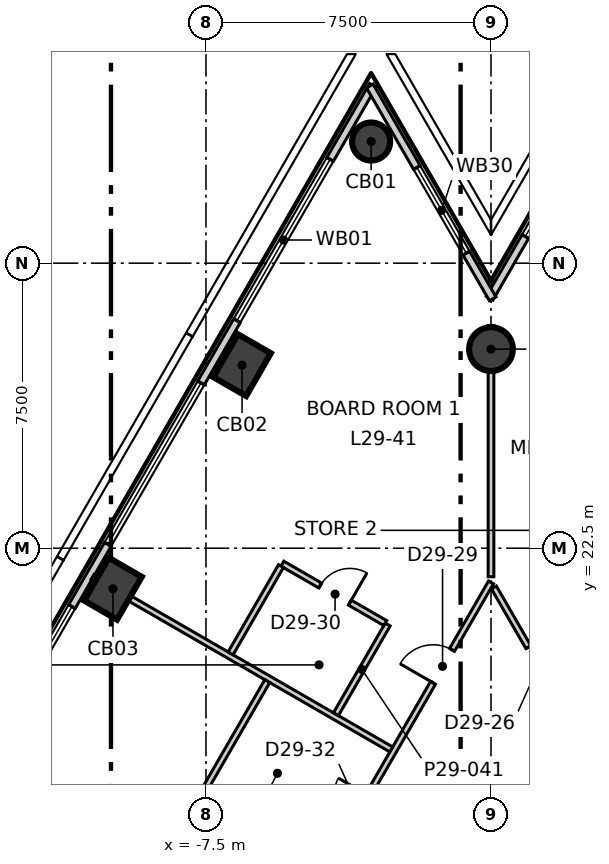
"""IFC4 building model, lengths in metres.
Left out: names, types, materials, properties, quantities, classifications, styles, units other than length and angle.
Written with IfcOpenShell. Run it as: python <this file> out.ifc"""

import sys

from ifc_helpers import new_model, si_unit, direction, frame, frame_2d, origin, origin_2d, place, context, subcontext, project, spatial, rectangle, circle, extrude, element, fill, save


model = new_model("IFC4")
c1 = context("Model", 3, precision=1e-05, world=origin(), true_north=direction((0.0, 1.0)))
c2 = subcontext(c1, "Body", "Model", "MODEL_VIEW")
j1 = project(units=[si_unit("LENGTHUNIT", "METRE"), si_unit("PLANEANGLEUNIT", "RADIAN")], contexts=[c1])
p1 = place(None, origin())
s1 = spatial("IfcSite", under=j1, at=p1, CompositionType="ELEMENT")
p2 = place(p1, origin())
s2 = spatial("IfcBuilding", under=s1, at=p2, CompositionType="ELEMENT")
p3 = place(p2, frame((0.0, 0.0, 128.3)))
s3 = spatial("IfcBuildingStorey", under=s2, at=p3, CompositionType="ELEMENT", Elevation=128.3)
p4 = place(p3, frame((-3.154, 33.201, -0.3), z_axis=(0.0, 0.0, 1.0), x_axis=(0.5, 0.866025403784, 0.0)))
e1 = element("IfcColumn", 1, at=p4, inside=s3, PredefinedType="COLUMN", context=c2, shape_type="SweptSolid", body=[
    extrude(circle(Radius=0.5, at=origin_2d()), origin(), (0.0, 0.0, 1.0), 4.0),
])
for number, where, z_axis, x_axis in (
    (2, (-6.551, 27.317, -0.3), (0.0, 0.0, 1.0), (0.5, 0.866, 0.0)),
    (3, (-9.948, 21.434, -0.3), (0.0, 0.0, 1.0), (0.5, 0.866, 0.0)),
):
    element("IfcColumn", number, at=place(p3, frame(where, z_axis=z_axis, x_axis=x_axis)), inside=s3, PredefinedType="COLUMN", context=c2, shape_type="SweptSolid", body=[
        extrude(rectangle(XDim=1.3, YDim=1.0, at=origin_2d()), origin(), (0.0, 0.0, 1.0), 4.0),
    ])
p5 = place(p3, frame((0.0, 27.739, -0.3), z_axis=(0.0, 0.0, 1.0), x_axis=(1.0, 0.0, 0.0)))
e4 = element("IfcColumn", 4, at=p5, inside=s3, PredefinedType="COLUMN", context=c2, shape_type="SweptSolid", body=[
    extrude(circle(Radius=0.575, at=origin_2d()), origin(), (0.0, 0.0, 1.0), 4.0),
])
p6 = place(p3, frame((-3.109, 34.679, 0.0), z_axis=(0.0, 0.0, 1.0), x_axis=(-0.50000689325, -0.866021423928, 0.0)))
e5 = element("IfcWall", 5, at=p6, inside=s3, PredefinedType="ELEMENTEDWALL", context=c2, shape_type="SweptSolid", body=[
    extrude(rectangle(XDim=56.937, YDim=0.2, at=frame_2d((28.469, 0.0))), origin(), (0.0, 0.0, 1.0), 3.7),
])
p7 = place(p6, frame((2.249, 0.0, 0.9)))
e6 = element("IfcOpeningElement", 6, at=p7, cuts=e5, PredefinedType="OPENING", context=c2, shape_type="SweptSolid", body=[
    extrude(rectangle(XDim=4.9, YDim=2.5, at=frame_2d((2.45, 1.25))), frame((0.0, 0.11, 0.0), z_axis=(0.0, -1.0, 0.0), x_axis=(1.0, 0.0, 0.0)), (0.0, 0.0, 1.0), 0.22),
])
p8 = place(p6, frame((9.043, 0.0, 0.9)))
e7 = element("IfcOpeningElement", 7, at=p8, cuts=e5, PredefinedType="OPENING", context=c2, shape_type="SweptSolid", body=[
    extrude(rectangle(XDim=4.9, YDim=2.5, at=frame_2d((2.45, 1.25))), frame((0.0, 0.11, 0.0), z_axis=(0.0, -1.0, 0.0), x_axis=(1.0, 0.0, 0.0)), (0.0, 0.0, 1.0), 0.22),
])
p9 = place(p6, frame((15.837, 0.0, 0.9)))
e8 = element("IfcOpeningElement", 8, at=p9, cuts=e5, PredefinedType="OPENING", context=c2, shape_type="SweptSolid", body=[
    extrude(rectangle(XDim=4.9, YDim=2.5, at=frame_2d((2.45, 1.25))), frame((0.0, 0.11, 0.0), z_axis=(0.0, -1.0, 0.0), x_axis=(1.0, 0.0, 0.0)), (0.0, 0.0, 1.0), 0.22),
])
p10 = place(p6, frame((22.631, 0.0, 0.9)))
e9 = element("IfcOpeningElement", 9, at=p10, cuts=e5, PredefinedType="OPENING", context=c2, shape_type="SweptSolid", body=[
    extrude(rectangle(XDim=4.9, YDim=2.5, at=frame_2d((2.45, 1.25))), frame((0.0, 0.11, 0.0), z_axis=(0.0, -1.0, 0.0), x_axis=(1.0, 0.0, 0.0)), (0.0, 0.0, 1.0), 0.22),
])
p11 = place(p6, frame((29.425, 0.0, 0.9)))
e10 = element("IfcOpeningElement", 10, at=p11, cuts=e5, PredefinedType="OPENING", context=c2, shape_type="SweptSolid", body=[
    extrude(rectangle(XDim=4.9, YDim=2.5, at=frame_2d((2.45, 1.25))), frame((0.0, 0.11, 0.0), z_axis=(0.0, -1.0, 0.0), x_axis=(1.0, 0.0, 0.0)), (0.0, 0.0, 1.0), 0.22),
])
p12 = place(p6, frame((36.219, 0.0, 0.9)))
e11 = element("IfcOpeningElement", 11, at=p12, cuts=e5, PredefinedType="OPENING", context=c2, shape_type="SweptSolid", body=[
    extrude(rectangle(XDim=4.9, YDim=2.5, at=frame_2d((2.45, 1.25))), frame((0.0, 0.11, 0.0), z_axis=(0.0, -1.0, 0.0), x_axis=(1.0, 0.0, 0.0)), (0.0, 0.0, 1.0), 0.22),
])
p13 = place(p6, frame((43.013, 0.0, 0.9)))
e12 = element("IfcOpeningElement", 12, at=p13, cuts=e5, PredefinedType="OPENING", context=c2, shape_type="SweptSolid", body=[
    extrude(rectangle(XDim=4.9, YDim=2.5, at=frame_2d((2.45, 1.25))), frame((0.0, 0.11, 0.0), z_axis=(0.0, -1.0, 0.0), x_axis=(1.0, 0.0, 0.0)), (0.0, 0.0, 1.0), 0.22),
])
p14 = place(p6, frame((49.807, 0.0, 0.9)))
e13 = element("IfcOpeningElement", 13, at=p14, cuts=e5, PredefinedType="OPENING", context=c2, shape_type="SweptSolid", body=[
    extrude(rectangle(XDim=4.9, YDim=2.5, at=frame_2d((2.45, 1.25))), frame((0.0, 0.11, 0.0), z_axis=(0.0, -1.0, 0.0), x_axis=(1.0, 0.0, 0.0)), (0.0, 0.0, 1.0), 0.22),
])
p15 = place(p3, frame((3.199, 34.679, 0.0), z_axis=(0.0, 0.0, 1.0), x_axis=(-0.500012177251, -0.866018373131, 0.0)))
e14 = element("IfcWall", 14, at=p15, inside=s3, PredefinedType="ELEMENTEDWALL", context=c2, shape_type="SweptSolid", body=[
    extrude(rectangle(XDim=6.468, YDim=0.2, at=frame_2d((3.234, 0.0))), origin(), (0.0, 0.0, 1.0), 3.7),
])
p16 = place(p15, frame((1.99, 0.0, 0.9)))
e15 = element("IfcOpeningElement", 15, at=p16, cuts=e14, PredefinedType="OPENING", context=c2, shape_type="SweptSolid", body=[
    extrude(rectangle(XDim=2.6, YDim=2.5, at=frame_2d((1.3, 1.25))), frame((0.0, 0.11, 0.0), z_axis=(0.0, -1.0, 0.0), x_axis=(1.0, 0.0, 0.0)), (0.0, 0.0, 1.0), 0.22),
])
p17 = place(p3, frame((0.045, 29.061, 0.0), z_axis=(0.0, 0.0, 1.0), x_axis=(-0.500012177251, 0.866018373131, 0.0)))
e16 = element("IfcWall", 16, at=p17, inside=s3, PredefinedType="ELEMENTEDWALL", context=c2, shape_type="SweptSolid", body=[
    extrude(rectangle(XDim=6.468, YDim=0.2, at=frame_2d((3.234, 0.0))), origin(), (0.0, 0.0, 1.0), 3.7),
])
p18 = place(p17, frame((1.39, 0.0, 0.9)))
e17 = element("IfcOpeningElement", 17, at=p18, cuts=e16, PredefinedType="OPENING", context=c2, shape_type="SweptSolid", body=[
    extrude(rectangle(XDim=2.6, YDim=2.5, at=frame_2d((1.3, 1.25))), frame((0.0, 0.11, 0.0), z_axis=(0.0, -1.0, 0.0), x_axis=(1.0, 0.0, 0.0)), (0.0, 0.0, 1.0), 0.22),
])
p19 = place(p3, frame((-8.903, 6.18, 0.0), z_axis=(0.0, 0.0, 1.0), x_axis=(0.500010074151, 0.866019587393, 0.0)))
e18 = element("IfcWall", 18, at=p19, inside=s3, PredefinedType="PARTITIONING", context=c2, shape_type="SweptSolid", body=[
    extrude(rectangle(XDim=17.806, YDim=0.15, at=frame_2d((8.903, 0.0))), origin(), (0.0, 0.0, 1.0), 3.7),
])
p20 = place(p19, frame((14.756, 0.0, 0.0)))
e19 = element("IfcOpeningElement", 19, at=p20, cuts=e18, PredefinedType="OPENING", context=c2, shape_type="SweptSolid", body=[
    extrude(rectangle(XDim=1.0, YDim=2.1, at=frame_2d((0.5, 1.05))), frame((0.0, 0.085, 0.0), z_axis=(0.0, -1.0, 0.0), x_axis=(1.0, 0.0, 0.0)), (0.0, 0.0, 1.0), 0.17),
])
p21 = place(p19, frame((2.838, 0.0, 0.0)))
e20 = element("IfcOpeningElement", 20, at=p21, cuts=e18, PredefinedType="OPENING", context=c2, shape_type="SweptSolid", body=[
    extrude(rectangle(XDim=1.1, YDim=2.1, at=frame_2d((0.55, 1.05))), frame((0.0, 0.085, 0.0), z_axis=(0.0, -1.0, 0.0), x_axis=(1.0, 0.0, 0.0)), (0.0, 0.0, 1.0), 0.17),
])
p22 = place(p19, frame((10.438, 0.0, 0.0)))
e21 = element("IfcOpeningElement", 21, at=p22, cuts=e18, PredefinedType="OPENING", context=c2, shape_type="SweptSolid", body=[
    extrude(rectangle(XDim=0.9, YDim=2.1, at=frame_2d((0.45, 1.05))), frame((0.0, 0.085, 0.0), z_axis=(0.0, -1.0, 0.0), x_axis=(1.0, 0.0, 0.0)), (0.0, 0.0, 1.0), 0.17),
])
p23 = place(p19, frame((7.438, 0.0, 0.0)))
e22 = element("IfcOpeningElement", 22, at=p23, cuts=e18, PredefinedType="OPENING", context=c2, shape_type="SweptSolid", body=[
    extrude(rectangle(XDim=0.9, YDim=2.1, at=frame_2d((0.45, 1.05))), frame((0.0, 0.085, 0.0), z_axis=(0.0, -1.0, 0.0), x_axis=(1.0, 0.0, 0.0)), (0.0, 0.0, 1.0), 0.17),
])
p24 = place(p3, frame((-10.485, 21.744, 0.0), z_axis=(0.0, 0.0, 1.0), x_axis=(0.866014937375, -0.500018127915, 0.0)))
e23 = element("IfcWall", 23, at=p24, inside=s3, PredefinedType="PARTITIONING", context=c2, shape_type="SweptSolid", body=[
    extrude(rectangle(XDim=9.077, YDim=0.15, at=frame_2d((4.539, 0.0))), origin(), (0.0, 0.0, 1.0), 3.7),
])
p25 = place(p3, frame((-7.65, 15.95, 0.0), z_axis=(0.0, 0.0, 1.0), x_axis=(0.500064136673, 0.865988371292, 0.0)))
e24 = element("IfcWall", 24, at=p25, inside=s3, PredefinedType="PARTITIONING", context=c2, shape_type="SweptSolid", body=[
    extrude(rectangle(XDim=3.525, YDim=0.15, at=frame_2d((1.763, 0.0))), origin(), (0.0, 0.0, 1.0), 3.7),
])
p26 = place(p3, frame((0.0, 21.75, 0.0), z_axis=(0.0, 0.0, 1.0), x_axis=(0.0, 1.0, 0.0)))
e25 = element("IfcWall", 25, at=p26, inside=s3, PredefinedType="PARTITIONING", context=c2, shape_type="SweptSolid", body=[
    extrude(rectangle(XDim=6.609, YDim=0.15, at=frame_2d((3.304, 0.0))), origin(), (0.0, 0.0, 1.0), 3.15),
])
p27 = place(p3, frame((0.076, 21.468, 0.0), z_axis=(0.0, 0.0, 1.0), x_axis=(0.50001203818, -0.866018453426, 0.0)))
e26 = element("IfcWall", 26, at=p27, inside=s3, PredefinedType="PARTITIONING", context=c2, shape_type="SweptSolid", body=[
    extrude(rectangle(XDim=24.448, YDim=0.15, at=frame_2d((12.224, 0.0))), origin(), (0.0, 0.0, 1.0), 3.7),
])
p28 = place(p27, frame((9.798, 0.0, 0.0)))
e27 = element("IfcOpeningElement", 27, at=p28, cuts=e26, PredefinedType="OPENING", context=c2, shape_type="SweptSolid", body=[
    extrude(rectangle(XDim=1.1, YDim=2.1, at=frame_2d((0.55, 1.05))), frame((0.0, 0.085, 0.0), z_axis=(0.0, -1.0, 0.0), x_axis=(1.0, 0.0, 0.0)), (0.0, 0.0, 1.0), 0.17),
])
p29 = place(p27, frame((19.198, 0.0, 0.0)))
e28 = element("IfcOpeningElement", 28, at=p29, cuts=e26, PredefinedType="OPENING", context=c2, shape_type="SweptSolid", body=[
    extrude(rectangle(XDim=0.9, YDim=2.1, at=frame_2d((0.45, 1.05))), frame((0.0, 0.085, 0.0), z_axis=(0.0, -1.0, 0.0), x_axis=(1.0, 0.0, 0.0)), (0.0, 0.0, 1.0), 0.17),
])
p30 = place(p27, frame((16.398, 0.0, 0.0)))
e29 = element("IfcOpeningElement", 29, at=p30, cuts=e26, PredefinedType="OPENING", context=c2, shape_type="SweptSolid", body=[
    extrude(rectangle(XDim=1.0, YDim=2.1, at=frame_2d((0.5, 1.05))), frame((0.0, 0.085, 0.0), z_axis=(0.0, -1.0, 0.0), x_axis=(1.0, 0.0, 0.0)), (0.0, 0.0, 1.0), 0.17),
])
p31 = place(p27, frame((1.815, 0.0, 0.0)))
e30 = element("IfcOpeningElement", 30, at=p31, cuts=e26, PredefinedType="OPENING", context=c2, shape_type="SweptSolid", body=[
    extrude(rectangle(XDim=1.1, YDim=2.1, at=frame_2d((0.55, 1.05))), frame((0.0, 0.085, 0.0), z_axis=(0.0, -1.0, 0.0), x_axis=(1.0, 0.0, 0.0)), (0.0, 0.0, 1.0), 0.17),
])
p32 = place(p3, frame((-4.08, 18.133, 0.0), z_axis=(0.0, 0.0, 1.0), x_axis=(0.499887924105, 0.866090101164, 0.0)))
e31 = element("IfcWall", 31, at=p32, inside=s3, PredefinedType="PARTITIONING", context=c2, shape_type="SweptSolid", body=[
    extrude(rectangle(XDim=2.725, YDim=0.15, at=frame_2d((1.362, 0.0))), origin(), (0.0, 0.0, 1.0), 3.7),
])
p33 = place(p3, frame((-5.489, 22.093, 0.0), z_axis=(0.0, 0.0, 1.0), x_axis=(0.865935755868, -0.500155242608, 0.0)))
e32 = element("IfcWall", 32, at=p33, inside=s3, PredefinedType="PARTITIONING", context=c2, shape_type="SweptSolid", body=[
    extrude(rectangle(XDim=3.125, YDim=0.15, at=frame_2d((1.562, 0.0))), origin(), (0.0, 0.0, 1.0), 3.7),
])
p34 = place(p33, frame((1.15, 0.0, 0.0)))
e33 = element("IfcOpeningElement", 33, at=p34, cuts=e32, PredefinedType="OPENING", context=c2, shape_type="SweptSolid", body=[
    extrude(rectangle(XDim=0.9, YDim=2.1, at=frame_2d((0.45, 1.05))), frame((0.0, 0.085, 0.0), z_axis=(0.0, -1.0, 0.0), x_axis=(1.0, 0.0, 0.0)), (0.0, 0.0, 1.0), 0.17),
])
p35 = place(p3, frame((-6.852, 19.733, 0.0), z_axis=(0.0, 0.0, 1.0), x_axis=(0.499953715521, 0.866052124492, 0.0)))
e34 = element("IfcWall", 34, at=p35, inside=s3, PredefinedType="PARTITIONING", context=c2, shape_type="SweptSolid", body=[
    extrude(rectangle(XDim=2.65, YDim=0.15, at=frame_2d((1.325, 0.0))), origin(), (0.0, 0.0, 1.0), 3.7),
])
p36 = place(p7, origin())
e35 = element("IfcWindow", 35, at=p36, inside=s3, PartitioningType="SINGLE_PANEL", PredefinedType="WINDOW", context=c2, shape_type="SweptSolid", body=[
    extrude(rectangle(XDim=4.9, YDim=2.5, at=frame_2d((2.45, 1.25))), frame((0.0, 0.03, 0.0), z_axis=(0.0, -1.0, 0.0), x_axis=(1.0, 0.0, 0.0)), (0.0, 0.0, 1.0), 0.06),
])
fill(e6, e35)
p37 = place(p8, origin())
e36 = element("IfcWindow", 36, at=p37, inside=s3, PartitioningType="SINGLE_PANEL", PredefinedType="WINDOW", context=c2, shape_type="SweptSolid", body=[
    extrude(rectangle(XDim=4.9, YDim=2.5, at=frame_2d((2.45, 1.25))), frame((0.0, 0.03, 0.0), z_axis=(0.0, -1.0, 0.0), x_axis=(1.0, 0.0, 0.0)), (0.0, 0.0, 1.0), 0.06),
])
fill(e7, e36)
p38 = place(p9, origin())
e37 = element("IfcWindow", 37, at=p38, inside=s3, PartitioningType="SINGLE_PANEL", PredefinedType="WINDOW", context=c2, shape_type="SweptSolid", body=[
    extrude(rectangle(XDim=4.9, YDim=2.5, at=frame_2d((2.45, 1.25))), frame((0.0, 0.03, 0.0), z_axis=(0.0, -1.0, 0.0), x_axis=(1.0, 0.0, 0.0)), (0.0, 0.0, 1.0), 0.06),
])
fill(e8, e37)
p39 = place(p16, origin())
e38 = element("IfcWindow", 38, at=p39, inside=s3, PartitioningType="SINGLE_PANEL", PredefinedType="WINDOW", context=c2, shape_type="SweptSolid", body=[
    extrude(rectangle(XDim=2.6, YDim=2.5, at=frame_2d((1.3, 1.25))), frame((0.0, 0.03, 0.0), z_axis=(0.0, -1.0, 0.0), x_axis=(1.0, 0.0, 0.0)), (0.0, 0.0, 1.0), 0.06),
])
fill(e15, e38)
p40 = place(p18, origin())
e39 = element("IfcWindow", 39, at=p40, inside=s3, PartitioningType="SINGLE_PANEL", PredefinedType="WINDOW", context=c2, shape_type="SweptSolid", body=[
    extrude(rectangle(XDim=2.6, YDim=2.5, at=frame_2d((1.3, 1.25))), frame((0.0, 0.03, 0.0), z_axis=(0.0, -1.0, 0.0), x_axis=(1.0, 0.0, 0.0)), (0.0, 0.0, 1.0), 0.06),
])
fill(e17, e39)
p41 = place(p31, origin())
e40 = element("IfcDoor", 40, at=p41, inside=s3, OperationType="SINGLE_SWING_LEFT", PredefinedType="DOOR", context=c2, shape_type="SweptSolid", body=[
    extrude(rectangle(XDim=1.1, YDim=2.1, at=frame_2d((0.55, 1.05))), frame((0.0, 0.025, 0.0), z_axis=(0.0, -1.0, 0.0), x_axis=(1.0, 0.0, 0.0)), (0.0, 0.0, 1.0), 0.05),
])
fill(e30, e40)
p42 = place(p20, origin())
e41 = element("IfcDoor", 41, at=p42, inside=s3, OperationType="SINGLE_SWING_RIGHT", PredefinedType="DOOR", context=c2, shape_type="SweptSolid", body=[
    extrude(rectangle(XDim=1.0, YDim=2.1, at=frame_2d((0.5, 1.05))), frame((0.0, 0.025, 0.0), z_axis=(0.0, -1.0, 0.0), x_axis=(1.0, 0.0, 0.0)), (0.0, 0.0, 1.0), 0.05),
])
fill(e19, e41)
p43 = place(p34, origin())
e42 = element("IfcDoor", 42, at=p43, inside=s3, OperationType="SINGLE_SWING_LEFT", PredefinedType="DOOR", context=c2, shape_type="SweptSolid", body=[
    extrude(rectangle(XDim=0.9, YDim=2.1, at=frame_2d((0.45, 1.05))), frame((0.0, 0.025, 0.0), z_axis=(0.0, -1.0, 0.0), x_axis=(1.0, 0.0, 0.0)), (0.0, 0.0, 1.0), 0.05),
])
fill(e33, e42)
save(model, sys.argv[1])
